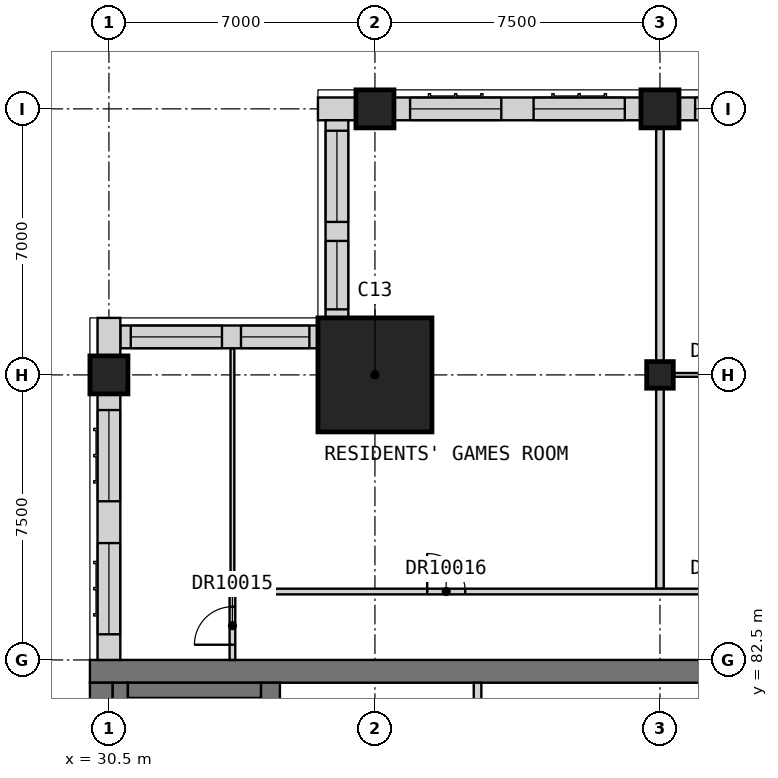
"""IFC4 building model, lengths in metres.
Left out: names, types, materials, properties, quantities, classifications, styles, units other than length and angle.
Written with IfcOpenShell. Run it as: python <this file> out.ifc"""

import sys

from ifc_helpers import new_model, si_unit, direction, frame, frame_2d, origin, origin_2d, place, context, subcontext, project, spatial, rectangle, extrude, element, fill, save


model = new_model("IFC4")
c1 = context("Model", 3, precision=1e-05, world=origin(), true_north=direction((0.0, 1.0)))
c2 = subcontext(c1, "Body", "Model", "MODEL_VIEW")
j1 = project(units=[si_unit("LENGTHUNIT", "METRE"), si_unit("PLANEANGLEUNIT", "RADIAN")], contexts=[c1])
p1 = place(None, origin())
s1 = spatial("IfcSite", under=j1, at=p1, CompositionType="ELEMENT")
p2 = place(p1, origin())
s2 = spatial("IfcBuilding", under=s1, at=p2, CompositionType="ELEMENT")
p3 = place(p2, frame((0.0, 0.0, 273.2)))
s3 = spatial("IfcBuildingStorey", under=s2, at=p3, CompositionType="ELEMENT", Elevation=273.2)
for number, where, z_axis, x_axis in (
    (1, (30.5, 90.0, 0.0), (0.0, 0.0, 1.0), (1.0, 0.0, 0.0)),
    (2, (37.5, 97.0, 0.0), (0.0, 0.0, 1.0), (1.0, 0.0, 0.0)),
):
    element("IfcColumn", number, at=place(p3, frame(where, z_axis=z_axis, x_axis=x_axis)), inside=s3, PredefinedType="COLUMN", context=c2, shape_type="SweptSolid", body=[
        extrude(rectangle(XDim=1.0, YDim=1.0, at=origin_2d()), origin(), (0.0, 0.0, 1.0), 3.5),
    ])
p4 = place(p3, frame((45.0, 90.0, 0.0), z_axis=(0.0, 0.0, 1.0), x_axis=(1.0, 0.0, 0.0)))
e3 = element("IfcColumn", 3, at=p4, inside=s3, PredefinedType="COLUMN", context=c2, shape_type="SweptSolid", body=[
    extrude(rectangle(XDim=0.7, YDim=0.7, at=origin_2d()), origin(), (0.0, 0.0, 1.0), 3.5),
])
p5 = place(p3, frame((45.0, 97.0, 0.0), z_axis=(0.0, 0.0, 1.0), x_axis=(1.0, 0.0, 0.0)))
e4 = element("IfcColumn", 4, at=p5, inside=s3, PredefinedType="COLUMN", context=c2, shape_type="SweptSolid", body=[
    extrude(rectangle(XDim=1.0, YDim=1.0, at=origin_2d()), origin(), (0.0, 0.0, 1.0), 3.5),
])
p6 = place(p3, frame((37.5, 90.0, 0.0), z_axis=(0.0, 0.0, 1.0), x_axis=(1.0, 0.0, 0.0)))
e5 = element("IfcColumn", 5, at=p6, inside=s3, PredefinedType="COLUMN", context=c2, shape_type="SweptSolid", body=[
    extrude(rectangle(XDim=3.0, YDim=3.0, at=origin_2d()), origin(), (0.0, 0.0, 1.0), 3.5),
])
p7 = place(p3, frame((30.0, 82.2, 0.0), z_axis=(0.0, 0.0, 1.0), x_axis=(1.0, 0.0, 0.0)))
e6 = element("IfcWall", 6, at=p7, inside=s3, PredefinedType="SHEAR", context=c2, shape_type="SweptSolid", body=[
    extrude(rectangle(XDim=30.0, YDim=0.6, at=frame_2d((15.0, 0.0))), origin(), (0.0, 0.0, 1.0), 3.5),
])
p8 = place(p3, frame((30.3, 60.6, 0.0), z_axis=(0.0, 0.0, 1.0), x_axis=(0.0, 1.0, 0.0)))
e7 = element("IfcWall", 7, at=p8, inside=s3, PredefinedType="SHEAR", context=c2, shape_type="SweptSolid", body=[
    extrude(rectangle(XDim=21.3, YDim=0.6, at=frame_2d((10.65, 0.0))), origin(), (0.0, 0.0, 1.0), 3.5),
])
p9 = place(p3, frame((34.75, 78.3, 0.0), z_axis=(0.0, 0.0, 1.0), x_axis=(0.0, 1.0, 0.0)))
e8 = element("IfcWall", 8, at=p9, inside=s3, PredefinedType="SHEAR", context=c2, shape_type="SweptSolid", body=[
    extrude(rectangle(XDim=3.6, YDim=0.5, at=frame_2d((1.8, 0.0))), origin(), (0.0, 0.0, 1.0), 3.5),
])
p10 = place(p3, frame((52.0, 97.0, 0.0), z_axis=(0.0, 0.0, 1.0), x_axis=(-1.0, 0.0, 0.0)))
e9 = element("IfcWall", 9, at=p10, inside=s3, PredefinedType="SOLIDWALL", context=c2, shape_type="SweptSolid", body=[
    extrude(rectangle(XDim=6.5, YDim=0.6, at=frame_2d((3.25, 0.0))), origin(), (0.0, 0.0, 1.0), 2.75),
])
p11 = place(p10, frame((3.675, 0.0, 0.8)))
e10 = element("IfcOpeningElement", 10, at=p11, cuts=e9, PredefinedType="OPENING", context=c2, shape_type="SweptSolid", body=[
    extrude(rectangle(XDim=2.4, YDim=1.8, at=frame_2d((1.2, 0.9))), frame((0.0, 0.31, 0.0), z_axis=(0.0, -1.0, 0.0), x_axis=(1.0, 0.0, 0.0)), (0.0, 0.0, 1.0), 0.62),
])
p12 = place(p10, frame((0.425, 0.0, 0.8)))
e11 = element("IfcOpeningElement", 11, at=p12, cuts=e9, PredefinedType="OPENING", context=c2, shape_type="SweptSolid", body=[
    extrude(rectangle(XDim=2.4, YDim=1.8, at=frame_2d((1.2, 0.9))), frame((0.0, 0.31, 0.0), z_axis=(0.0, -1.0, 0.0), x_axis=(1.0, 0.0, 0.0)), (0.0, 0.0, 1.0), 0.62),
])
p13 = place(p3, frame((44.5, 97.0, 0.0), z_axis=(0.0, 0.0, 1.0), x_axis=(-1.0, 0.0, 0.0)))
e12 = element("IfcWall", 12, at=p13, inside=s3, PredefinedType="SOLIDWALL", context=c2, shape_type="SweptSolid", body=[
    extrude(rectangle(XDim=6.5, YDim=0.6, at=frame_2d((3.25, 0.0))), origin(), (0.0, 0.0, 1.0), 2.75),
])
p14 = place(p13, frame((3.675, 0.0, 0.8)))
e13 = element("IfcOpeningElement", 13, at=p14, cuts=e12, PredefinedType="OPENING", context=c2, shape_type="SweptSolid", body=[
    extrude(rectangle(XDim=2.4, YDim=1.8, at=frame_2d((1.2, 0.9))), frame((0.0, 0.31, 0.0), z_axis=(0.0, -1.0, 0.0), x_axis=(1.0, 0.0, 0.0)), (0.0, 0.0, 1.0), 0.62),
])
p15 = place(p13, frame((0.425, 0.0, 0.8)))
e14 = element("IfcOpeningElement", 14, at=p15, cuts=e12, PredefinedType="OPENING", context=c2, shape_type="SweptSolid", body=[
    extrude(rectangle(XDim=2.4, YDim=1.8, at=frame_2d((1.2, 0.9))), frame((0.0, 0.31, 0.0), z_axis=(0.0, -1.0, 0.0), x_axis=(1.0, 0.0, 0.0)), (0.0, 0.0, 1.0), 0.62),
])
p16 = place(p3, frame((37.0, 97.0, 0.0), z_axis=(0.0, 0.0, 1.0), x_axis=(-1.0, 0.0, 0.0)))
e15 = element("IfcWall", 15, at=p16, inside=s3, PredefinedType="SOLIDWALL", context=c2, shape_type="SweptSolid", body=[
    extrude(rectangle(XDim=1.0, YDim=0.6, at=frame_2d((0.5, 0.0))), origin(), (0.0, 0.0, 1.0), 3.25),
])
p17 = place(p3, frame((36.5, 96.7, 0.0), z_axis=(0.0, 0.0, 1.0), x_axis=(0.0, -1.0, 0.0)))
e16 = element("IfcWall", 16, at=p17, inside=s3, PredefinedType="SOLIDWALL", context=c2, shape_type="SweptSolid", body=[
    extrude(rectangle(XDim=5.2, YDim=0.6, at=frame_2d((2.6, 0.0))), origin(), (0.0, 0.0, 1.0), 3.25),
])
p18 = place(p17, frame((3.175, 0.0, 0.8)))
e17 = element("IfcOpeningElement", 17, at=p18, cuts=e16, PredefinedType="OPENING", context=c2, shape_type="SweptSolid", body=[
    extrude(rectangle(XDim=1.8, YDim=1.8, at=frame_2d((0.9, 0.9))), frame((0.0, 0.31, 0.0), z_axis=(0.0, -1.0, 0.0), x_axis=(1.0, 0.0, 0.0)), (0.0, 0.0, 1.0), 0.62),
])
p19 = place(p17, frame((0.275, 0.0, 0.8)))
e18 = element("IfcOpeningElement", 18, at=p19, cuts=e16, PredefinedType="OPENING", context=c2, shape_type="SweptSolid", body=[
    extrude(rectangle(XDim=2.4, YDim=1.8, at=frame_2d((1.2, 0.9))), frame((0.0, 0.31, 0.0), z_axis=(0.0, -1.0, 0.0), x_axis=(1.0, 0.0, 0.0)), (0.0, 0.0, 1.0), 0.62),
])
p20 = place(p3, frame((36.0, 91.0, 0.0), z_axis=(0.0, 0.0, 1.0), x_axis=(-1.0, 0.0, 0.0)))
e19 = element("IfcWall", 19, at=p20, inside=s3, PredefinedType="SOLIDWALL", context=c2, shape_type="SweptSolid", body=[
    extrude(rectangle(XDim=5.2, YDim=0.6, at=frame_2d((2.6, 0.0))), origin(), (0.0, 0.0, 1.0), 3.25),
])
p21 = place(p20, frame((2.525, 0.0, 0.8)))
e20 = element("IfcOpeningElement", 20, at=p21, cuts=e19, PredefinedType="OPENING", context=c2, shape_type="SweptSolid", body=[
    extrude(rectangle(XDim=2.4, YDim=1.8, at=frame_2d((1.2, 0.9))), frame((0.0, 0.31, 0.0), z_axis=(0.0, -1.0, 0.0), x_axis=(1.0, 0.0, 0.0)), (0.0, 0.0, 1.0), 0.62),
])
p22 = place(p20, frame((0.225, 0.0, 0.8)))
e21 = element("IfcOpeningElement", 21, at=p22, cuts=e19, PredefinedType="OPENING", context=c2, shape_type="SweptSolid", body=[
    extrude(rectangle(XDim=1.8, YDim=1.8, at=frame_2d((0.9, 0.9))), frame((0.0, 0.31, 0.0), z_axis=(0.0, -1.0, 0.0), x_axis=(1.0, 0.0, 0.0)), (0.0, 0.0, 1.0), 0.62),
])
p23 = place(p3, frame((30.5, 91.5, 0.0), z_axis=(0.0, 0.0, 1.0), x_axis=(0.0, -1.0, 0.0)))
e22 = element("IfcWall", 22, at=p23, inside=s3, PredefinedType="SOLIDWALL", context=c2, shape_type="SweptSolid", body=[
    extrude(rectangle(XDim=1.0, YDim=0.6, at=frame_2d((0.5, 0.0))), origin(), (0.0, 0.0, 1.0), 3.25),
])
p24 = place(p3, frame((30.5, 89.5, 0.0), z_axis=(0.0, 0.0, 1.0), x_axis=(0.0, -1.0, 0.0)))
e23 = element("IfcWall", 23, at=p24, inside=s3, PredefinedType="SOLIDWALL", context=c2, shape_type="SweptSolid", body=[
    extrude(rectangle(XDim=7.0, YDim=0.6, at=frame_2d((3.5, 0.0))), origin(), (0.0, 0.0, 1.0), 3.25),
])
p25 = place(p24, frame((3.925, 0.0, 0.8)))
e24 = element("IfcOpeningElement", 24, at=p25, cuts=e23, PredefinedType="OPENING", context=c2, shape_type="SweptSolid", body=[
    extrude(rectangle(XDim=2.4, YDim=1.8, at=frame_2d((1.2, 0.9))), frame((0.0, 0.31, 0.0), z_axis=(0.0, -1.0, 0.0), x_axis=(1.0, 0.0, 0.0)), (0.0, 0.0, 1.0), 0.62),
])
p26 = place(p24, frame((0.425, 0.0, 0.8)))
e25 = element("IfcOpeningElement", 25, at=p26, cuts=e23, PredefinedType="OPENING", context=c2, shape_type="SweptSolid", body=[
    extrude(rectangle(XDim=2.4, YDim=1.8, at=frame_2d((1.2, 0.9))), frame((0.0, 0.31, 0.0), z_axis=(0.0, -1.0, 0.0), x_axis=(1.0, 0.0, 0.0)), (0.0, 0.0, 1.0), 0.62),
])
p27 = place(p3, frame((40.2, 78.5, 0.0), z_axis=(0.0, 0.0, 1.0), x_axis=(0.0, 1.0, 0.0)))
e26 = element("IfcWall", 26, at=p27, inside=s3, PredefinedType="SOLIDWALL", context=c2, shape_type="SweptSolid", body=[
    extrude(rectangle(XDim=3.4, YDim=0.2, at=frame_2d((1.7, 0.0))), origin(), (0.0, 0.0, 1.0), 3.5),
])
p28 = place(p3, frame((30.8, 60.6, 0.0), z_axis=(0.0, 0.0, 1.0), x_axis=(0.0, 1.0, 0.0)))
e27 = element("IfcWall", 27, at=p28, inside=s3, PredefinedType="SOLIDWALL", context=c2, shape_type="SweptSolid", body=[
    extrude(rectangle(XDim=21.3, YDim=0.4, at=frame_2d((10.65, 0.0))), origin(), (0.0, 0.0, 1.0), 3.25),
])
p29 = place(p3, frame((31.0, 81.7, 0.0), z_axis=(0.0, 0.0, 1.0), x_axis=(1.0, 0.0, 0.0)))
e28 = element("IfcWall", 28, at=p29, inside=s3, PredefinedType="SOLIDWALL", context=c2, shape_type="SweptSolid", body=[
    extrude(rectangle(XDim=3.5, YDim=0.4, at=frame_2d((1.75, 0.0))), origin(), (0.0, 0.0, 1.0), 3.25),
])
p30 = place(p3, frame((45.0, 84.375, 0.0), z_axis=(0.0, 0.0, 1.0), x_axis=(0.0, 1.0, 0.0)))
e29 = element("IfcWall", 29, at=p30, inside=s3, PredefinedType="PARTITIONING", context=c2, shape_type="SweptSolid", body=[
    extrude(rectangle(XDim=13.125, YDim=0.2, at=frame_2d((6.562, 0.0))), origin(), (0.0, 0.0, 1.0), 3.25),
])
p31 = place(p3, frame((33.75, 84.3, 0.0), z_axis=(0.0, 0.0, 1.0), x_axis=(1.0, 0.0, 0.0)))
e30 = element("IfcWall", 30, at=p31, inside=s3, PredefinedType="PARTITIONING", context=c2, shape_type="SweptSolid", body=[
    extrude(rectangle(XDim=28.05, YDim=0.15, at=frame_2d((14.025, 0.0))), origin(), (0.0, 0.0, 1.0), 3.25),
])
p32 = place(p31, frame((5.125, 0.0, 0.0)))
e31 = element("IfcOpeningElement", 31, at=p32, cuts=e30, PredefinedType="OPENING", context=c2, shape_type="SweptSolid", body=[
    extrude(rectangle(XDim=1.0, YDim=2.1, at=frame_2d((0.5, 1.05))), frame((0.0, 0.085, 0.0), z_axis=(0.0, -1.0, 0.0), x_axis=(1.0, 0.0, 0.0)), (0.0, 0.0, 1.0), 0.17),
])
p33 = place(p31, frame((12.675, 0.0, 0.0)))
e32 = element("IfcOpeningElement", 32, at=p33, cuts=e30, PredefinedType="OPENING", context=c2, shape_type="SweptSolid", body=[
    extrude(rectangle(XDim=0.9, YDim=2.1, at=frame_2d((0.45, 1.05))), frame((0.0, 0.085, 0.0), z_axis=(0.0, -1.0, 0.0), x_axis=(1.0, 0.0, 0.0)), (0.0, 0.0, 1.0), 0.17),
])
p34 = place(p31, frame((20.175, 0.0, 0.0)))
e33 = element("IfcOpeningElement", 33, at=p34, cuts=e30, PredefinedType="OPENING", context=c2, shape_type="SweptSolid", body=[
    extrude(rectangle(XDim=0.9, YDim=2.1, at=frame_2d((0.45, 1.05))), frame((0.0, 0.085, 0.0), z_axis=(0.0, -1.0, 0.0), x_axis=(1.0, 0.0, 0.0)), (0.0, 0.0, 1.0), 0.17),
])
p35 = place(p31, frame((26.65, 0.0, 0.0)))
e34 = element("IfcOpeningElement", 34, at=p35, cuts=e30, PredefinedType="OPENING", context=c2, shape_type="SweptSolid", body=[
    extrude(rectangle(XDim=1.0, YDim=2.1, at=frame_2d((0.5, 1.05))), frame((0.0, 0.085, 0.0), z_axis=(0.0, -1.0, 0.0), x_axis=(1.0, 0.0, 0.0)), (0.0, 0.0, 1.0), 0.17),
])
p36 = place(p3, frame((33.75, 82.5, 0.0), z_axis=(0.0, 0.0, 1.0), x_axis=(0.0, 1.0, 0.0)))
e35 = element("IfcWall", 35, at=p36, inside=s3, PredefinedType="PARTITIONING", context=c2, shape_type="SweptSolid", body=[
    extrude(rectangle(XDim=1.725, YDim=0.15, at=frame_2d((0.863, 0.0))), origin(), (0.0, 0.0, 1.0), 3.25),
])
p37 = place(p36, frame((0.4, 0.0, 0.0)))
e36 = element("IfcOpeningElement", 36, at=p37, cuts=e35, PredefinedType="OPENING", context=c2, shape_type="SweptSolid", body=[
    extrude(rectangle(XDim=1.0, YDim=2.1, at=frame_2d((0.5, 1.05))), frame((0.0, 0.085, 0.0), z_axis=(0.0, -1.0, 0.0), x_axis=(1.0, 0.0, 0.0)), (0.0, 0.0, 1.0), 0.17),
])
p38 = place(p3, frame((45.1, 90.0, 0.0), z_axis=(0.0, 0.0, 1.0), x_axis=(1.0, 0.0, 0.0)))
e37 = element("IfcWall", 37, at=p38, inside=s3, PredefinedType="PARTITIONING", context=c2, shape_type="SweptSolid", body=[
    extrude(rectangle(XDim=14.8, YDim=0.1, at=frame_2d((7.4, 0.0))), origin(), (0.0, 0.0, 1.0), 3.25),
])
p39 = place(p38, frame((1.325, 0.0, 0.0)))
e38 = element("IfcOpeningElement", 38, at=p39, cuts=e37, PredefinedType="OPENING", context=c2, shape_type="SweptSolid", body=[
    extrude(rectangle(XDim=0.9, YDim=2.1, at=frame_2d((0.45, 1.05))), frame((0.0, 0.06, 0.0), z_axis=(0.0, -1.0, 0.0), x_axis=(1.0, 0.0, 0.0)), (0.0, 0.0, 1.0), 0.12),
])
p40 = place(p38, frame((8.825, 0.0, 0.0)))
e39 = element("IfcOpeningElement", 39, at=p40, cuts=e37, PredefinedType="OPENING", context=c2, shape_type="SweptSolid", body=[
    extrude(rectangle(XDim=0.9, YDim=2.1, at=frame_2d((0.45, 1.05))), frame((0.0, 0.06, 0.0), z_axis=(0.0, -1.0, 0.0), x_axis=(1.0, 0.0, 0.0)), (0.0, 0.0, 1.0), 0.12),
])
p41 = place(p3, frame((33.75, 84.375, 0.0), z_axis=(0.0, 0.0, 1.0), x_axis=(0.0, 1.0, 0.0)))
e40 = element("IfcWall", 40, at=p41, inside=s3, PredefinedType="PARTITIONING", context=c2, shape_type="SweptSolid", body=[
    extrude(rectangle(XDim=6.315, YDim=0.1, at=frame_2d((3.157, 0.0))), origin(), (0.0, 0.0, 1.0), 3.25),
])
p42 = place(p11, origin())
e41 = element("IfcWindow", 41, at=p42, inside=s3, PartitioningType="SINGLE_PANEL", PredefinedType="WINDOW", context=c2, shape_type="SweptSolid", body=[
    extrude(rectangle(XDim=2.4, YDim=1.8, at=frame_2d((1.2, 0.9))), frame((0.0, -0.07, 0.0), z_axis=(0.0, -1.0, 0.0), x_axis=(1.0, 0.0, 0.0)), (0.0, 0.0, 1.0), 0.06),
])
fill(e10, e41)
p43 = place(p14, origin())
e42 = element("IfcWindow", 42, at=p43, inside=s3, PartitioningType="SINGLE_PANEL", PredefinedType="WINDOW", context=c2, shape_type="SweptSolid", body=[
    extrude(rectangle(XDim=2.4, YDim=1.8, at=frame_2d((1.2, 0.9))), frame((0.0, -0.07, 0.0), z_axis=(0.0, -1.0, 0.0), x_axis=(1.0, 0.0, 0.0)), (0.0, 0.0, 1.0), 0.06),
])
fill(e13, e42)
p44 = place(p15, origin())
e43 = element("IfcWindow", 43, at=p44, inside=s3, PartitioningType="SINGLE_PANEL", PredefinedType="WINDOW", context=c2, shape_type="SweptSolid", body=[
    extrude(rectangle(XDim=2.4, YDim=1.8, at=frame_2d((1.2, 0.9))), frame((0.0, -0.07, 0.0), z_axis=(0.0, -1.0, 0.0), x_axis=(1.0, 0.0, 0.0)), (0.0, 0.0, 1.0), 0.06),
])
fill(e14, e43)
p45 = place(p18, origin())
e44 = element("IfcWindow", 44, at=p45, inside=s3, PartitioningType="SINGLE_PANEL", PredefinedType="WINDOW", context=c2, shape_type="SweptSolid", body=[
    extrude(rectangle(XDim=1.8, YDim=1.8, at=frame_2d((0.9, 0.9))), frame((0.0, -0.07, 0.0), z_axis=(0.0, -1.0, 0.0), x_axis=(1.0, 0.0, 0.0)), (0.0, 0.0, 1.0), 0.06),
])
fill(e17, e44)
p46 = place(p19, origin())
e45 = element("IfcWindow", 45, at=p46, inside=s3, PartitioningType="SINGLE_PANEL", PredefinedType="WINDOW", context=c2, shape_type="SweptSolid", body=[
    extrude(rectangle(XDim=2.4, YDim=1.8, at=frame_2d((1.2, 0.9))), frame((0.0, -0.07, 0.0), z_axis=(0.0, -1.0, 0.0), x_axis=(1.0, 0.0, 0.0)), (0.0, 0.0, 1.0), 0.06),
])
fill(e18, e45)
p47 = place(p21, origin())
e46 = element("IfcWindow", 46, at=p47, inside=s3, PartitioningType="SINGLE_PANEL", PredefinedType="WINDOW", context=c2, shape_type="SweptSolid", body=[
    extrude(rectangle(XDim=2.4, YDim=1.8, at=frame_2d((1.2, 0.9))), frame((0.0, -0.07, 0.0), z_axis=(0.0, -1.0, 0.0), x_axis=(1.0, 0.0, 0.0)), (0.0, 0.0, 1.0), 0.06),
])
fill(e20, e46)
p48 = place(p22, origin())
e47 = element("IfcWindow", 47, at=p48, inside=s3, PartitioningType="SINGLE_PANEL", PredefinedType="WINDOW", context=c2, shape_type="SweptSolid", body=[
    extrude(rectangle(XDim=1.8, YDim=1.8, at=frame_2d((0.9, 0.9))), frame((0.0, -0.07, 0.0), z_axis=(0.0, -1.0, 0.0), x_axis=(1.0, 0.0, 0.0)), (0.0, 0.0, 1.0), 0.06),
])
fill(e21, e47)
p49 = place(p25, origin())
e48 = element("IfcWindow", 48, at=p49, inside=s3, PartitioningType="SINGLE_PANEL", PredefinedType="WINDOW", context=c2, shape_type="SweptSolid", body=[
    extrude(rectangle(XDim=2.4, YDim=1.8, at=frame_2d((1.2, 0.9))), frame((0.0, -0.07, 0.0), z_axis=(0.0, -1.0, 0.0), x_axis=(1.0, 0.0, 0.0)), (0.0, 0.0, 1.0), 0.06),
])
fill(e24, e48)
p50 = place(p26, origin())
e49 = element("IfcWindow", 49, at=p50, inside=s3, PartitioningType="SINGLE_PANEL", PredefinedType="WINDOW", context=c2, shape_type="SweptSolid", body=[
    extrude(rectangle(XDim=2.4, YDim=1.8, at=frame_2d((1.2, 0.9))), frame((0.0, -0.07, 0.0), z_axis=(0.0, -1.0, 0.0), x_axis=(1.0, 0.0, 0.0)), (0.0, 0.0, 1.0), 0.06),
])
fill(e25, e49)
p51 = place(p37, origin())
e50 = element("IfcDoor", 50, at=p51, inside=s3, OperationType="SINGLE_SWING_LEFT", PredefinedType="DOOR", context=c2, shape_type="SweptSolid", body=[
    extrude(rectangle(XDim=1.0, YDim=2.1, at=frame_2d((0.5, 1.05))), frame((0.0, 0.025, 0.0), z_axis=(0.0, -1.0, 0.0), x_axis=(1.0, 0.0, 0.0)), (0.0, 0.0, 1.0), 0.05),
])
fill(e36, e50)
p52 = place(p32, origin())
e51 = element("IfcDoor", 51, at=p52, inside=s3, OperationType="SINGLE_SWING_LEFT", PredefinedType="DOOR", context=c2, shape_type="SweptSolid", body=[
    extrude(rectangle(XDim=1.0, YDim=2.1, at=frame_2d((0.5, 1.05))), frame((0.0, 0.025, 0.0), z_axis=(0.0, -1.0, 0.0), x_axis=(1.0, 0.0, 0.0)), (0.0, 0.0, 1.0), 0.05),
])
fill(e31, e51)
save(model, sys.argv[1])
